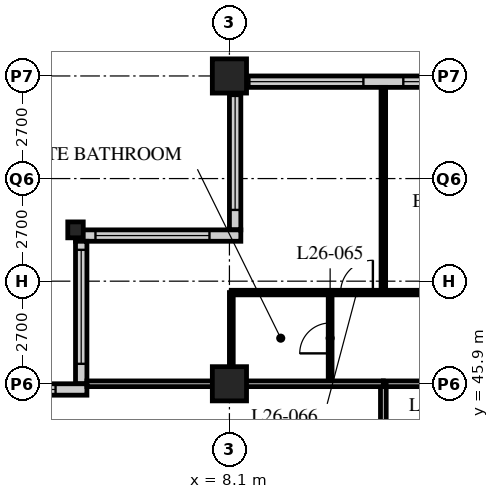
"""IFC4 building model, lengths in metres.
Left out: names, types, materials, properties, quantities, classifications, styles, units other than length and angle.
Written with IfcOpenShell. Run it as: python <this file> out.ifc"""

import sys

from ifc_helpers import new_model, si_unit, direction, frame, frame_2d, origin, origin_2d, place, context, subcontext, project, spatial, rectangle, hollow_rectangle, i_section, extrude, element, fill, save


model = new_model("IFC4")
c1 = context("Model", 3, precision=1e-05, world=origin(), true_north=direction((0.0, 1.0)))
c2 = subcontext(c1, "Body", "Model", "MODEL_VIEW")
j1 = project(units=[si_unit("LENGTHUNIT", "METRE"), si_unit("PLANEANGLEUNIT", "RADIAN")], contexts=[c1])
p1 = place(None, origin())
s1 = spatial("IfcSite", under=j1, at=p1, CompositionType="ELEMENT")
p2 = place(p1, origin())
s2 = spatial("IfcBuilding", under=s1, at=p2, CompositionType="ELEMENT")
p3 = place(p2, frame((0.0, 0.0, 106.8)))
s3 = spatial("IfcBuildingStorey", under=s2, at=p3, CompositionType="ELEMENT", Elevation=106.8)
p4 = place(p3, frame((4.05, 49.95, 0.0), z_axis=(0.0, 0.0, 1.0), x_axis=(1.0, 0.0, 0.0)))
e1 = element("IfcColumn", 1, at=p4, inside=s3, PredefinedType="COLUMN", context=c2, shape_type="SweptSolid", body=[
    extrude(i_section(OverallWidth=0.407, OverallDepth=0.419, WebThickness=0.031, FlangeThickness=0.049, FilletRadius=0.015, at=origin_2d()), origin(), (0.0, 0.0, 1.0), 3.4),
])
for number, where, z_axis, x_axis in (
    (2, (8.1, 45.9, 0.0), (0.0, 0.0, 1.0), (1.0, 0.0, 0.0)),
    (3, (8.1, 54.0, 0.0), (0.0, 0.0, 1.0), (1.0, 0.0, 0.0)),
):
    element("IfcColumn", number, at=place(p3, frame(where, z_axis=z_axis, x_axis=x_axis)), inside=s3, PredefinedType="COLUMN", context=c2, shape_type="SweptSolid", body=[
        extrude(hollow_rectangle(XDim=0.9, YDim=0.9, WallThickness=0.09, at=origin_2d()), origin(), (0.0, 0.0, 1.0), 3.4),
    ])
p5 = place(p3, frame((48.3, 53.85, 0.0), z_axis=(0.0, 0.0, 1.0), x_axis=(-1.0, 0.0, 0.0)))
e4 = element("IfcWall", 4, at=p5, inside=s3, PredefinedType="SOLIDWALL", context=c2, shape_type="SweptSolid", body=[
    extrude(rectangle(XDim=40.2, YDim=0.3, at=frame_2d((20.1, 0.0))), origin(), (0.0, 0.0, 1.0), 3.19),
])
p6 = place(p5, frame((0.225, 0.0, 0.9)))
e5 = element("IfcOpeningElement", 5, at=p6, cuts=e4, PredefinedType="OPENING", context=c2, shape_type="SweptSolid", body=[
    extrude(rectangle(XDim=3.0, YDim=2.0, at=frame_2d((1.5, 1.0))), frame((0.0, 0.16, 0.0), z_axis=(0.0, -1.0, 0.0), x_axis=(1.0, 0.0, 0.0)), (0.0, 0.0, 1.0), 0.32),
])
p7 = place(p5, frame((4.275, 0.0, 0.9)))
e6 = element("IfcOpeningElement", 6, at=p7, cuts=e4, PredefinedType="OPENING", context=c2, shape_type="SweptSolid", body=[
    extrude(rectangle(XDim=3.0, YDim=2.0, at=frame_2d((1.5, 1.0))), frame((0.0, 0.16, 0.0), z_axis=(0.0, -1.0, 0.0), x_axis=(1.0, 0.0, 0.0)), (0.0, 0.0, 1.0), 0.32),
])
p8 = place(p5, frame((8.325, 0.0, 0.9)))
e7 = element("IfcOpeningElement", 7, at=p8, cuts=e4, PredefinedType="OPENING", context=c2, shape_type="SweptSolid", body=[
    extrude(rectangle(XDim=3.0, YDim=2.0, at=frame_2d((1.5, 1.0))), frame((0.0, 0.16, 0.0), z_axis=(0.0, -1.0, 0.0), x_axis=(1.0, 0.0, 0.0)), (0.0, 0.0, 1.0), 0.32),
])
p9 = place(p5, frame((12.375, 0.0, 0.9)))
e8 = element("IfcOpeningElement", 8, at=p9, cuts=e4, PredefinedType="OPENING", context=c2, shape_type="SweptSolid", body=[
    extrude(rectangle(XDim=3.0, YDim=2.0, at=frame_2d((1.5, 1.0))), frame((0.0, 0.16, 0.0), z_axis=(0.0, -1.0, 0.0), x_axis=(1.0, 0.0, 0.0)), (0.0, 0.0, 1.0), 0.32),
])
p10 = place(p5, frame((16.425, 0.0, 0.9)))
e9 = element("IfcOpeningElement", 9, at=p10, cuts=e4, PredefinedType="OPENING", context=c2, shape_type="SweptSolid", body=[
    extrude(rectangle(XDim=3.0, YDim=2.0, at=frame_2d((1.5, 1.0))), frame((0.0, 0.16, 0.0), z_axis=(0.0, -1.0, 0.0), x_axis=(1.0, 0.0, 0.0)), (0.0, 0.0, 1.0), 0.32),
])
p11 = place(p5, frame((20.475, 0.0, 0.9)))
e10 = element("IfcOpeningElement", 10, at=p11, cuts=e4, PredefinedType="OPENING", context=c2, shape_type="SweptSolid", body=[
    extrude(rectangle(XDim=3.0, YDim=2.0, at=frame_2d((1.5, 1.0))), frame((0.0, 0.16, 0.0), z_axis=(0.0, -1.0, 0.0), x_axis=(1.0, 0.0, 0.0)), (0.0, 0.0, 1.0), 0.32),
])
p12 = place(p5, frame((24.525, 0.0, 0.9)))
e11 = element("IfcOpeningElement", 11, at=p12, cuts=e4, PredefinedType="OPENING", context=c2, shape_type="SweptSolid", body=[
    extrude(rectangle(XDim=3.0, YDim=2.0, at=frame_2d((1.5, 1.0))), frame((0.0, 0.16, 0.0), z_axis=(0.0, -1.0, 0.0), x_axis=(1.0, 0.0, 0.0)), (0.0, 0.0, 1.0), 0.32),
])
p13 = place(p5, frame((28.575, 0.0, 0.9)))
e12 = element("IfcOpeningElement", 12, at=p13, cuts=e4, PredefinedType="OPENING", context=c2, shape_type="SweptSolid", body=[
    extrude(rectangle(XDim=3.0, YDim=2.0, at=frame_2d((1.5, 1.0))), frame((0.0, 0.16, 0.0), z_axis=(0.0, -1.0, 0.0), x_axis=(1.0, 0.0, 0.0)), (0.0, 0.0, 1.0), 0.32),
])
p14 = place(p5, frame((32.625, 0.0, 0.9)))
e13 = element("IfcOpeningElement", 13, at=p14, cuts=e4, PredefinedType="OPENING", context=c2, shape_type="SweptSolid", body=[
    extrude(rectangle(XDim=3.0, YDim=2.0, at=frame_2d((1.5, 1.0))), frame((0.0, 0.16, 0.0), z_axis=(0.0, -1.0, 0.0), x_axis=(1.0, 0.0, 0.0)), (0.0, 0.0, 1.0), 0.32),
])
p15 = place(p5, frame((36.675, 0.0, 0.9)))
e14 = element("IfcOpeningElement", 14, at=p15, cuts=e4, PredefinedType="OPENING", context=c2, shape_type="SweptSolid", body=[
    extrude(rectangle(XDim=3.0, YDim=2.0, at=frame_2d((1.5, 1.0))), frame((0.0, 0.16, 0.0), z_axis=(0.0, -1.0, 0.0), x_axis=(1.0, 0.0, 0.0)), (0.0, 0.0, 1.0), 0.32),
])
p16 = place(p3, frame((8.25, 53.7, 0.0), z_axis=(0.0, 0.0, 1.0), x_axis=(0.0, -1.0, 0.0)))
e15 = element("IfcWall", 15, at=p16, inside=s3, PredefinedType="SOLIDWALL", context=c2, shape_type="SweptSolid", body=[
    extrude(rectangle(XDim=3.75, YDim=0.3, at=frame_2d((1.875, 0.0))), origin(), (0.0, 0.0, 1.0), 3.19),
])
p17 = place(p16, frame((0.225, 0.0, 0.9)))
e16 = element("IfcOpeningElement", 16, at=p17, cuts=e15, PredefinedType="OPENING", context=c2, shape_type="SweptSolid", body=[
    extrude(rectangle(XDim=3.0, YDim=1.5, at=frame_2d((1.5, 0.75))), frame((0.0, 0.16, 0.0), z_axis=(0.0, -1.0, 0.0), x_axis=(1.0, 0.0, 0.0)), (0.0, 0.0, 1.0), 0.32),
])
p18 = place(p3, frame((8.4, 49.8, 0.0), z_axis=(0.0, 0.0, 1.0), x_axis=(-1.0, 0.0, 0.0)))
e17 = element("IfcWall", 17, at=p18, inside=s3, PredefinedType="SOLIDWALL", context=c2, shape_type="SweptSolid", body=[
    extrude(rectangle(XDim=4.35, YDim=0.3, at=frame_2d((2.175, 0.0))), origin(), (0.0, 0.0, 1.0), 3.19),
])
p19 = place(p18, frame((0.825, 0.0, 0.9)))
e18 = element("IfcOpeningElement", 18, at=p19, cuts=e17, PredefinedType="OPENING", context=c2, shape_type="SweptSolid", body=[
    extrude(rectangle(XDim=3.0, YDim=1.5, at=frame_2d((1.5, 0.75))), frame((0.0, 0.16, 0.0), z_axis=(0.0, -1.0, 0.0), x_axis=(1.0, 0.0, 0.0)), (0.0, 0.0, 1.0), 0.32),
])
p20 = place(p3, frame((4.2, 49.65, 0.0), z_axis=(0.0, 0.0, 1.0), x_axis=(0.0, -1.0, 0.0)))
e19 = element("IfcWall", 19, at=p20, inside=s3, PredefinedType="SOLIDWALL", context=c2, shape_type="SweptSolid", body=[
    extrude(rectangle(XDim=3.75, YDim=0.3, at=frame_2d((1.875, 0.0))), origin(), (0.0, 0.0, 1.0), 3.19),
])
p21 = place(p20, frame((0.225, 0.0, 0.9)))
e20 = element("IfcOpeningElement", 20, at=p21, cuts=e19, PredefinedType="OPENING", context=c2, shape_type="SweptSolid", body=[
    extrude(rectangle(XDim=3.0, YDim=1.5, at=frame_2d((1.5, 0.75))), frame((0.0, 0.16, 0.0), z_axis=(0.0, -1.0, 0.0), x_axis=(1.0, 0.0, 0.0)), (0.0, 0.0, 1.0), 0.32),
])
p22 = place(p3, frame((4.35, 45.75, 0.0), z_axis=(0.0, 0.0, 1.0), x_axis=(-1.0, 0.0, 0.0)))
e21 = element("IfcWall", 21, at=p22, inside=s3, PredefinedType="SOLIDWALL", context=c2, shape_type="SweptSolid", body=[
    extrude(rectangle(XDim=4.35, YDim=0.3, at=frame_2d((2.175, 0.0))), origin(), (0.0, 0.0, 1.0), 3.19),
])
p23 = place(p22, frame((0.825, 0.0, 0.9)))
e22 = element("IfcOpeningElement", 22, at=p23, cuts=e21, PredefinedType="OPENING", context=c2, shape_type="SweptSolid", body=[
    extrude(rectangle(XDim=3.0, YDim=1.5, at=frame_2d((1.5, 0.75))), frame((0.0, 0.16, 0.0), z_axis=(0.0, -1.0, 0.0), x_axis=(1.0, 0.0, 0.0)), (0.0, 0.0, 1.0), 0.32),
])
p24 = place(p3, frame((12.15, 45.9, 0.0), z_axis=(0.0, 0.0, 1.0), x_axis=(1.0, 0.0, 0.0)))
e23 = element("IfcWall", 23, at=p24, inside=s3, PredefinedType="PARTITIONING", context=c2, shape_type="SweptSolid", body=[
    extrude(rectangle(XDim=32.4, YDim=0.15, at=frame_2d((16.2, 0.0))), origin(), (0.0, 0.0, 1.0), 2.578),
])
p25 = place(p24, frame((9.5, 0.0, 0.0)))
e24 = element("IfcOpeningElement", 24, at=p25, cuts=e23, PredefinedType="OPENING", context=c2, shape_type="SweptSolid", body=[
    extrude(rectangle(XDim=1.0, YDim=2.1, at=frame_2d((0.5, 1.05))), frame((0.0, 0.085, 0.0), z_axis=(0.0, -1.0, 0.0), x_axis=(1.0, 0.0, 0.0)), (0.0, 0.0, 1.0), 0.17),
])
p26 = place(p24, frame((17.6, 0.0, 0.0)))
e25 = element("IfcOpeningElement", 25, at=p26, cuts=e23, PredefinedType="OPENING", context=c2, shape_type="SweptSolid", body=[
    extrude(rectangle(XDim=1.0, YDim=2.1, at=frame_2d((0.5, 1.05))), frame((0.0, 0.085, 0.0), z_axis=(0.0, -1.0, 0.0), x_axis=(1.0, 0.0, 0.0)), (0.0, 0.0, 1.0), 0.17),
])
p27 = place(p24, frame((25.7, 0.0, 0.0)))
e26 = element("IfcOpeningElement", 26, at=p27, cuts=e23, PredefinedType="OPENING", context=c2, shape_type="SweptSolid", body=[
    extrude(rectangle(XDim=1.0, YDim=2.1, at=frame_2d((0.5, 1.05))), frame((0.0, 0.085, 0.0), z_axis=(0.0, -1.0, 0.0), x_axis=(1.0, 0.0, 0.0)), (0.0, 0.0, 1.0), 0.17),
])
p28 = place(p24, frame((29.875, 0.0, 0.0)))
e27 = element("IfcOpeningElement", 27, at=p28, cuts=e23, PredefinedType="OPENING", context=c2, shape_type="SweptSolid", body=[
    extrude(rectangle(XDim=1.0, YDim=2.1, at=frame_2d((0.5, 1.05))), frame((0.0, 0.085, 0.0), z_axis=(0.0, -1.0, 0.0), x_axis=(1.0, 0.0, 0.0)), (0.0, 0.0, 1.0), 0.17),
])
p29 = place(p24, frame((1.525, 0.0, 0.0)))
e28 = element("IfcOpeningElement", 28, at=p29, cuts=e23, PredefinedType="OPENING", context=c2, shape_type="SweptSolid", body=[
    extrude(rectangle(XDim=1.0, YDim=2.1, at=frame_2d((0.5, 1.05))), frame((0.0, 0.085, 0.0), z_axis=(0.0, -1.0, 0.0), x_axis=(1.0, 0.0, 0.0)), (0.0, 0.0, 1.0), 0.17),
])
p30 = place(p3, frame((12.15, 21.6, 0.0), z_axis=(0.0, 0.0, 1.0), x_axis=(0.0, 1.0, 0.0)))
e29 = element("IfcWall", 29, at=p30, inside=s3, PredefinedType="PARTITIONING", context=c2, shape_type="SweptSolid", body=[
    extrude(rectangle(XDim=24.3, YDim=0.15, at=frame_2d((12.15, 0.0))), origin(), (0.0, 0.0, 1.0), 3.19),
])
p31 = place(p30, frame((5.45, 0.0, 0.0)))
e30 = element("IfcOpeningElement", 30, at=p31, cuts=e29, PredefinedType="OPENING", context=c2, shape_type="SweptSolid", body=[
    extrude(rectangle(XDim=1.0, YDim=2.1, at=frame_2d((0.5, 1.05))), frame((0.0, 0.085, 0.0), z_axis=(0.0, -1.0, 0.0), x_axis=(1.0, 0.0, 0.0)), (0.0, 0.0, 1.0), 0.17),
])
p32 = place(p30, frame((13.55, 0.0, 0.0)))
e31 = element("IfcOpeningElement", 31, at=p32, cuts=e29, PredefinedType="OPENING", context=c2, shape_type="SweptSolid", body=[
    extrude(rectangle(XDim=1.0, YDim=2.1, at=frame_2d((0.5, 1.05))), frame((0.0, 0.085, 0.0), z_axis=(0.0, -1.0, 0.0), x_axis=(1.0, 0.0, 0.0)), (0.0, 0.0, 1.0), 0.17),
])
p33 = place(p30, frame((21.65, 0.0, 0.0)))
e32 = element("IfcOpeningElement", 32, at=p33, cuts=e29, PredefinedType="OPENING", context=c2, shape_type="SweptSolid", body=[
    extrude(rectangle(XDim=1.0, YDim=2.1, at=frame_2d((0.5, 1.05))), frame((0.0, 0.085, 0.0), z_axis=(0.0, -1.0, 0.0), x_axis=(1.0, 0.0, 0.0)), (0.0, 0.0, 1.0), 0.17),
])
p34 = place(p3, frame((10.75, 45.9, 0.0), z_axis=(0.0, 0.0, 1.0), x_axis=(0.0, 1.0, 0.0)))
e33 = element("IfcWall", 33, at=p34, inside=s3, PredefinedType="PARTITIONING", context=c2, shape_type="SweptSolid", body=[
    extrude(rectangle(XDim=2.4, YDim=0.1, at=frame_2d((1.2, 0.0))), origin(), (0.0, 0.0, 1.0), 3.19),
])
p35 = place(p34, frame((0.8, 0.0, 0.0)))
e34 = element("IfcOpeningElement", 34, at=p35, cuts=e33, PredefinedType="OPENING", context=c2, shape_type="SweptSolid", body=[
    extrude(rectangle(XDim=0.8, YDim=2.1, at=frame_2d((0.4, 1.05))), frame((0.0, 0.06, 0.0), z_axis=(0.0, -1.0, 0.0), x_axis=(1.0, 0.0, 0.0)), (0.0, 0.0, 1.0), 0.12),
])
p36 = place(p3, frame((8.15, 45.9, 0.0), z_axis=(0.0, 0.0, 1.0), x_axis=(0.0, 1.0, 0.0)))
e35 = element("IfcWall", 35, at=p36, inside=s3, PredefinedType="PARTITIONING", context=c2, shape_type="SweptSolid", body=[
    extrude(rectangle(XDim=2.4, YDim=0.1, at=frame_2d((1.2, 0.0))), origin(), (0.0, 0.0, 1.0), 2.578),
])
p37 = place(p3, frame((8.15, 48.3, 0.0), z_axis=(0.0, 0.0, 1.0), x_axis=(1.0, 0.0, 0.0)))
e36 = element("IfcWall", 36, at=p37, inside=s3, PredefinedType="PARTITIONING", context=c2, shape_type="SweptSolid", body=[
    extrude(rectangle(XDim=8.05, YDim=0.12, at=frame_2d((4.025, 0.0))), origin(), (0.0, 0.0, 1.0), 3.19),
])
p38 = place(p37, frame((6.725, 0.0, 0.0)))
e37 = element("IfcOpeningElement", 37, at=p38, cuts=e36, PredefinedType="OPENING", context=c2, shape_type="SweptSolid", body=[
    extrude(rectangle(XDim=0.85, YDim=2.1, at=frame_2d((0.425, 1.05))), frame((0.0, 0.07, 0.0), z_axis=(0.0, -1.0, 0.0), x_axis=(1.0, 0.0, 0.0)), (0.0, 0.0, 1.0), 0.14),
])
p39 = place(p37, frame((2.875, 0.0, 0.0)))
e38 = element("IfcOpeningElement", 38, at=p39, cuts=e36, PredefinedType="OPENING", context=c2, shape_type="SweptSolid", body=[
    extrude(rectangle(XDim=0.85, YDim=2.1, at=frame_2d((0.425, 1.05))), frame((0.0, 0.07, 0.0), z_axis=(0.0, -1.0, 0.0), x_axis=(1.0, 0.0, 0.0)), (0.0, 0.0, 1.0), 0.14),
])
p40 = place(p3, frame((12.15, 48.3, 0.0), z_axis=(0.0, 0.0, 1.0), x_axis=(0.0, 1.0, 0.0)))
e39 = element("IfcWall", 39, at=p40, inside=s3, PredefinedType="PARTITIONING", context=c2, shape_type="SweptSolid", body=[
    extrude(rectangle(XDim=5.4, YDim=0.12, at=frame_2d((2.7, 0.0))), origin(), (0.0, 0.0, 1.0), 3.19),
])
p41 = place(p3, frame((4.35, 45.9, 0.0), z_axis=(0.0, 0.0, 1.0), x_axis=(1.0, 0.0, 0.0)))
e40 = element("IfcWall", 40, at=p41, inside=s3, PredefinedType="PARTITIONING", context=c2, shape_type="SweptSolid", body=[
    extrude(rectangle(XDim=7.8, YDim=0.15, at=frame_2d((3.9, 0.0))), origin(), (0.0, 0.0, 1.0), 2.578),
])
p42 = place(p14, origin())
e41 = element("IfcWindow", 41, at=p42, inside=s3, PartitioningType="SINGLE_PANEL", PredefinedType="WINDOW", context=c2, shape_type="SweptSolid", body=[
    extrude(rectangle(XDim=3.0, YDim=2.0, at=frame_2d((1.5, 1.0))), frame((0.0, 0.03, 0.0), z_axis=(0.0, -1.0, 0.0), x_axis=(1.0, 0.0, 0.0)), (0.0, 0.0, 1.0), 0.06),
])
fill(e13, e41)
p43 = place(p15, origin())
e42 = element("IfcWindow", 42, at=p43, inside=s3, PartitioningType="SINGLE_PANEL", PredefinedType="WINDOW", context=c2, shape_type="SweptSolid", body=[
    extrude(rectangle(XDim=3.0, YDim=2.0, at=frame_2d((1.5, 1.0))), frame((0.0, 0.03, 0.0), z_axis=(0.0, -1.0, 0.0), x_axis=(1.0, 0.0, 0.0)), (0.0, 0.0, 1.0), 0.06),
])
fill(e14, e42)
p44 = place(p17, origin())
e43 = element("IfcWindow", 43, at=p44, inside=s3, PartitioningType="SINGLE_PANEL", PredefinedType="WINDOW", context=c2, shape_type="SweptSolid", body=[
    extrude(rectangle(XDim=3.0, YDim=1.5, at=frame_2d((1.5, 0.75))), frame((0.0, 0.03, 0.0), z_axis=(0.0, -1.0, 0.0), x_axis=(1.0, 0.0, 0.0)), (0.0, 0.0, 1.0), 0.06),
])
fill(e16, e43)
p45 = place(p19, origin())
e44 = element("IfcWindow", 44, at=p45, inside=s3, PartitioningType="SINGLE_PANEL", PredefinedType="WINDOW", context=c2, shape_type="SweptSolid", body=[
    extrude(rectangle(XDim=3.0, YDim=1.5, at=frame_2d((1.5, 0.75))), frame((0.0, 0.03, 0.0), z_axis=(0.0, -1.0, 0.0), x_axis=(1.0, 0.0, 0.0)), (0.0, 0.0, 1.0), 0.06),
])
fill(e18, e44)
p46 = place(p21, origin())
e45 = element("IfcWindow", 45, at=p46, inside=s3, PartitioningType="SINGLE_PANEL", PredefinedType="WINDOW", context=c2, shape_type="SweptSolid", body=[
    extrude(rectangle(XDim=3.0, YDim=1.5, at=frame_2d((1.5, 0.75))), frame((0.0, 0.03, 0.0), z_axis=(0.0, -1.0, 0.0), x_axis=(1.0, 0.0, 0.0)), (0.0, 0.0, 1.0), 0.06),
])
fill(e20, e45)
p47 = place(p23, origin())
e46 = element("IfcWindow", 46, at=p47, inside=s3, PartitioningType="SINGLE_PANEL", PredefinedType="WINDOW", context=c2, shape_type="SweptSolid", body=[
    extrude(rectangle(XDim=3.0, YDim=1.5, at=frame_2d((1.5, 0.75))), frame((0.0, 0.03, 0.0), z_axis=(0.0, -1.0, 0.0), x_axis=(1.0, 0.0, 0.0)), (0.0, 0.0, 1.0), 0.06),
])
fill(e22, e46)
p48 = place(p35, origin())
e47 = element("IfcDoor", 47, at=p48, inside=s3, OperationType="SINGLE_SWING_LEFT", PredefinedType="DOOR", context=c2, shape_type="SweptSolid", body=[
    extrude(rectangle(XDim=0.8, YDim=2.1, at=frame_2d((0.4, 1.05))), frame((0.0, 0.025, 0.0), z_axis=(0.0, -1.0, 0.0), x_axis=(1.0, 0.0, 0.0)), (0.0, 0.0, 1.0), 0.05),
])
fill(e34, e47)
p49 = place(p39, origin())
e48 = element("IfcDoor", 48, at=p49, inside=s3, OperationType="SINGLE_SWING_RIGHT", PredefinedType="DOOR", context=c2, shape_type="SweptSolid", body=[
    extrude(rectangle(XDim=0.85, YDim=2.1, at=frame_2d((0.425, 1.05))), frame((0.0, 0.025, 0.0), z_axis=(0.0, -1.0, 0.0), x_axis=(1.0, 0.0, 0.0)), (0.0, 0.0, 1.0), 0.05),
])
fill(e38, e48)
save(model, sys.argv[1])
